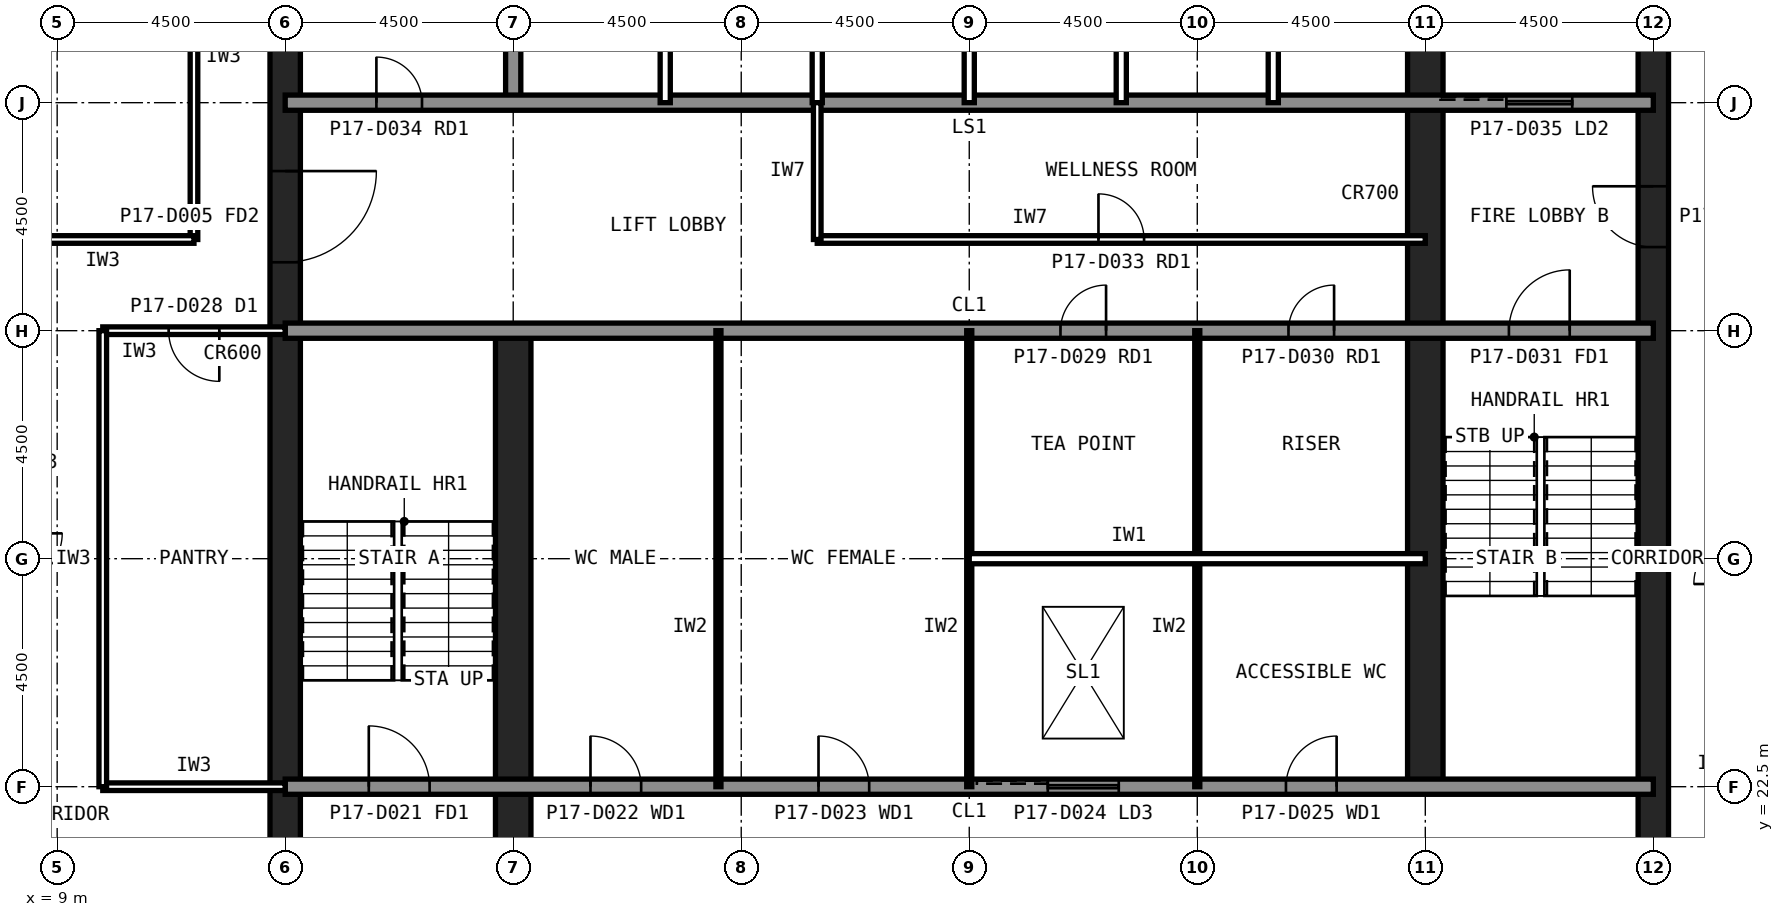
"""IFC4 building model, lengths in metres.
Left out: names, types, materials, properties, quantities, classifications, styles, units other than length and angle.
Written with IfcOpenShell. Run it as: python <this file> out.ifc"""

import sys

from ifc_helpers import new_model, si_unit, direction, frame, frame_2d, origin, place, context, subcontext, project, spatial, rectangle, extrude, element, fill, save


model = new_model("IFC4")
c1 = context("Model", 3, precision=1e-05, world=origin(), true_north=direction((0.0, 1.0)))
c2 = subcontext(c1, "Body", "Model", "MODEL_VIEW")
j1 = project(units=[si_unit("LENGTHUNIT", "METRE"), si_unit("PLANEANGLEUNIT", "RADIAN")], contexts=[c1])
p1 = place(None, origin())
s1 = spatial("IfcSite", under=j1, at=p1, CompositionType="ELEMENT")
p2 = place(p1, origin())
s2 = spatial("IfcBuilding", under=s1, at=p2, CompositionType="ELEMENT")
p3 = place(p2, frame((0.0, 0.0, 71.0)))
s3 = spatial("IfcBuildingStorey", under=s2, at=p3, CompositionType="ELEMENT", Elevation=71.0)
p4 = place(p3, frame((40.5, 13.5, 0.0), z_axis=(0.0, 0.0, 1.0), x_axis=(0.0, 1.0, 0.0)))
e1 = element("IfcWall", 1, at=p4, inside=s3, PredefinedType="SHEAR", context=c2, shape_type="SweptSolid", body=[
    extrude(rectangle(XDim=27.0, YDim=0.6, at=frame_2d((13.5, 0.0))), origin(), (0.0, 0.0, 1.0), 4.2),
])
p5 = place(p4, frame((5.85, 0.0, 0.0)))
e2 = element("IfcOpeningElement", 2, at=p5, cuts=e1, PredefinedType="OPENING", context=c2, shape_type="SweptSolid", body=[
    extrude(rectangle(XDim=1.8, YDim=2.1, at=frame_2d((0.9, 1.05))), frame((0.0, 0.31, 0.0), z_axis=(0.0, -1.0, 0.0), x_axis=(1.0, 0.0, 0.0)), (0.0, 0.0, 1.0), 0.62),
])
p6 = place(p4, frame((19.65, 0.0, 0.0)))
e3 = element("IfcOpeningElement", 3, at=p6, cuts=e1, PredefinedType="OPENING", context=c2, shape_type="SweptSolid", body=[
    extrude(rectangle(XDim=1.2, YDim=2.1, at=frame_2d((0.6, 1.05))), frame((0.0, 0.31, 0.0), z_axis=(0.0, -1.0, 0.0), x_axis=(1.0, 0.0, 0.0)), (0.0, 0.0, 1.0), 0.62),
])
p7 = place(p3, frame((13.5, 40.5, 0.0), z_axis=(0.0, 0.0, 1.0), x_axis=(0.0, -1.0, 0.0)))
e4 = element("IfcWall", 4, at=p7, inside=s3, PredefinedType="SHEAR", context=c2, shape_type="SweptSolid", body=[
    extrude(rectangle(XDim=27.0, YDim=0.6, at=frame_2d((13.5, 0.0))), origin(), (0.0, 0.0, 1.0), 4.2),
])
p8 = place(p7, frame((19.65, 0.0, 0.0)))
e5 = element("IfcOpeningElement", 5, at=p8, cuts=e4, PredefinedType="OPENING", context=c2, shape_type="SweptSolid", body=[
    extrude(rectangle(XDim=1.2, YDim=2.1, at=frame_2d((0.6, 1.05))), frame((0.0, 0.31, 0.0), z_axis=(0.0, -1.0, 0.0), x_axis=(1.0, 0.0, 0.0)), (0.0, 0.0, 1.0), 0.62),
])
p9 = place(p7, frame((5.85, 0.0, 0.0)))
e6 = element("IfcOpeningElement", 6, at=p9, cuts=e4, PredefinedType="OPENING", context=c2, shape_type="SweptSolid", body=[
    extrude(rectangle(XDim=1.8, YDim=2.1, at=frame_2d((0.9, 1.05))), frame((0.0, 0.31, 0.0), z_axis=(0.0, -1.0, 0.0), x_axis=(1.0, 0.0, 0.0)), (0.0, 0.0, 1.0), 0.62),
])
p10 = place(p3, frame((18.0, 13.5, 0.0), z_axis=(0.0, 0.0, 1.0), x_axis=(0.0, 1.0, 0.0)))
e7 = element("IfcWall", 7, at=p10, inside=s3, PredefinedType="SHEAR", context=c2, shape_type="SweptSolid", body=[
    extrude(rectangle(XDim=18.0, YDim=0.7, at=frame_2d((9.0, 0.0))), origin(), (0.0, 0.0, 1.0), 4.2),
])
p11 = place(p3, frame((18.0, 36.0, 0.0), z_axis=(0.0, 0.0, 1.0), x_axis=(0.0, 1.0, 0.0)))
e8 = element("IfcWall", 8, at=p11, inside=s3, PredefinedType="SOLIDWALL", context=c2, shape_type="SweptSolid", body=[
    extrude(rectangle(XDim=4.5, YDim=0.3, at=frame_2d((2.25, 0.0))), origin(), (0.0, 0.0, 1.0), 4.04),
])
p12 = place(p3, frame((36.0, 22.5, 0.0), z_axis=(0.0, 0.0, 1.0), x_axis=(0.0, 1.0, 0.0)))
e9 = element("IfcWall", 9, at=p12, inside=s3, PredefinedType="SHEAR", context=c2, shape_type="SweptSolid", body=[
    extrude(rectangle(XDim=18.0, YDim=0.7, at=frame_2d((9.0, 0.0))), origin(), (0.0, 0.0, 1.0), 4.2),
])
p13 = place(p3, frame((13.5, 36.0, 0.0), z_axis=(0.0, 0.0, 1.0), x_axis=(1.0, 0.0, 0.0)))
e10 = element("IfcWall", 10, at=p13, inside=s3, PredefinedType="SOLIDWALL", context=c2, shape_type="SweptSolid", body=[
    extrude(rectangle(XDim=27.0, YDim=0.3, at=frame_2d((13.5, 0.0))), origin(), (0.0, 0.0, 1.0), 4.04),
])
p14 = place(p13, frame((1.8, 0.0, 0.0)))
e11 = element("IfcOpeningElement", 11, at=p14, cuts=e10, PredefinedType="OPENING", context=c2, shape_type="SweptSolid", body=[
    extrude(rectangle(XDim=0.9, YDim=2.1, at=frame_2d((0.45, 1.05))), frame((0.0, 0.16, 0.0), z_axis=(0.0, -1.0, 0.0), x_axis=(1.0, 0.0, 0.0)), (0.0, 0.0, 1.0), 0.32),
])
p15 = place(p13, frame((24.1, 0.0, 0.0)))
e12 = element("IfcOpeningElement", 12, at=p15, cuts=e10, PredefinedType="OPENING", context=c2, shape_type="SweptSolid", body=[
    extrude(rectangle(XDim=1.3, YDim=2.2, at=frame_2d((0.65, 1.1))), frame((0.0, 0.16, 0.0), z_axis=(0.0, -1.0, 0.0), x_axis=(1.0, 0.0, 0.0)), (0.0, 0.0, 1.0), 0.32),
])
p16 = place(p3, frame((13.5, 22.5, 0.0), z_axis=(0.0, 0.0, 1.0), x_axis=(1.0, 0.0, 0.0)))
e13 = element("IfcWall", 13, at=p16, inside=s3, PredefinedType="SOLIDWALL", context=c2, shape_type="SweptSolid", body=[
    extrude(rectangle(XDim=27.0, YDim=0.3, at=frame_2d((13.5, 0.0))), origin(), (0.0, 0.0, 1.0), 4.04),
])
p17 = place(p16, frame((1.65, 0.0, 0.0)))
e14 = element("IfcOpeningElement", 14, at=p17, cuts=e13, PredefinedType="OPENING", context=c2, shape_type="SweptSolid", body=[
    extrude(rectangle(XDim=1.2, YDim=2.1, at=frame_2d((0.6, 1.05))), frame((0.0, 0.16, 0.0), z_axis=(0.0, -1.0, 0.0), x_axis=(1.0, 0.0, 0.0)), (0.0, 0.0, 1.0), 0.32),
])
p18 = place(p16, frame((6.025, 0.0, 0.0)))
e15 = element("IfcOpeningElement", 15, at=p18, cuts=e13, PredefinedType="OPENING", context=c2, shape_type="SweptSolid", body=[
    extrude(rectangle(XDim=1.0, YDim=2.1, at=frame_2d((0.5, 1.05))), frame((0.0, 0.16, 0.0), z_axis=(0.0, -1.0, 0.0), x_axis=(1.0, 0.0, 0.0)), (0.0, 0.0, 1.0), 0.32),
])
p19 = place(p16, frame((10.525, 0.0, 0.0)))
e16 = element("IfcOpeningElement", 16, at=p19, cuts=e13, PredefinedType="OPENING", context=c2, shape_type="SweptSolid", body=[
    extrude(rectangle(XDim=1.0, YDim=2.1, at=frame_2d((0.5, 1.05))), frame((0.0, 0.16, 0.0), z_axis=(0.0, -1.0, 0.0), x_axis=(1.0, 0.0, 0.0)), (0.0, 0.0, 1.0), 0.32),
])
p20 = place(p16, frame((19.75, 0.0, 0.0)))
e17 = element("IfcOpeningElement", 17, at=p20, cuts=e13, PredefinedType="OPENING", context=c2, shape_type="SweptSolid", body=[
    extrude(rectangle(XDim=1.0, YDim=2.1, at=frame_2d((0.5, 1.05))), frame((0.0, 0.16, 0.0), z_axis=(0.0, -1.0, 0.0), x_axis=(1.0, 0.0, 0.0)), (0.0, 0.0, 1.0), 0.32),
])
p21 = place(p16, frame((15.05, 0.0, 0.0)))
e18 = element("IfcOpeningElement", 18, at=p21, cuts=e13, PredefinedType="OPENING", context=c2, shape_type="SweptSolid", body=[
    extrude(rectangle(XDim=1.4, YDim=2.4, at=frame_2d((0.7, 1.2))), frame((0.0, 0.16, 0.0), z_axis=(0.0, -1.0, 0.0), x_axis=(1.0, 0.0, 0.0)), (0.0, 0.0, 1.0), 0.32),
])
p22 = place(p3, frame((13.5, 31.5, 0.0), z_axis=(0.0, 0.0, 1.0), x_axis=(1.0, 0.0, 0.0)))
e19 = element("IfcWall", 19, at=p22, inside=s3, PredefinedType="SOLIDWALL", context=c2, shape_type="SweptSolid", body=[
    extrude(rectangle(XDim=27.0, YDim=0.3, at=frame_2d((13.5, 0.0))), origin(), (0.0, 0.0, 1.0), 4.04),
])
p23 = place(p22, frame((24.15, 0.0, 0.0)))
e20 = element("IfcOpeningElement", 20, at=p23, cuts=e19, PredefinedType="OPENING", context=c2, shape_type="SweptSolid", body=[
    extrude(rectangle(XDim=1.2, YDim=2.1, at=frame_2d((0.6, 1.05))), frame((0.0, 0.16, 0.0), z_axis=(0.0, -1.0, 0.0), x_axis=(1.0, 0.0, 0.0)), (0.0, 0.0, 1.0), 0.32),
])
p24 = place(p22, frame((15.3, 0.0, 0.0)))
e21 = element("IfcOpeningElement", 21, at=p24, cuts=e19, PredefinedType="OPENING", context=c2, shape_type="SweptSolid", body=[
    extrude(rectangle(XDim=0.9, YDim=2.1, at=frame_2d((0.45, 1.05))), frame((0.0, 0.16, 0.0), z_axis=(0.0, -1.0, 0.0), x_axis=(1.0, 0.0, 0.0)), (0.0, 0.0, 1.0), 0.32),
])
p25 = place(p22, frame((19.8, 0.0, 0.0)))
e22 = element("IfcOpeningElement", 22, at=p25, cuts=e19, PredefinedType="OPENING", context=c2, shape_type="SweptSolid", body=[
    extrude(rectangle(XDim=0.9, YDim=2.1, at=frame_2d((0.45, 1.05))), frame((0.0, 0.16, 0.0), z_axis=(0.0, -1.0, 0.0), x_axis=(1.0, 0.0, 0.0)), (0.0, 0.0, 1.0), 0.32),
])
for number, where, z_axis, x_axis in (
    (23, (21.0, 36.0, 0.0), (0.0, 0.0, 1.0), (0.0, 1.0, 0.0)),
    (24, (24.0, 36.0, 0.0), (0.0, 0.0, 1.0), (0.0, 1.0, 0.0)),
    (25, (27.0, 36.0, 0.0), (0.0, 0.0, 1.0), (0.0, 1.0, 0.0)),
    (26, (30.0, 36.0, 0.0), (0.0, 0.0, 1.0), (0.0, 1.0, 0.0)),
    (27, (33.0, 36.0, 0.0), (0.0, 0.0, 1.0), (0.0, 1.0, 0.0)),
):
    element("IfcWall", number, at=place(p3, frame(where, z_axis=z_axis, x_axis=x_axis)), inside=s3, PredefinedType="PARTITIONING", context=c2, shape_type="SweptSolid", body=[
        extrude(rectangle(XDim=4.5, YDim=0.2, at=frame_2d((2.25, 0.0))), origin(), (0.0, 0.0, 1.0), 4.04),
    ])
for number, where, z_axis, x_axis in (
    (28, (22.05, 22.5, 0.0), (0.0, 0.0, 1.0), (0.0, 1.0, 0.0)),
    (29, (27.0, 22.5, 0.0), (0.0, 0.0, 1.0), (0.0, 1.0, 0.0)),
    (30, (31.5, 22.5, 0.0), (0.0, 0.0, 1.0), (0.0, 1.0, 0.0)),
):
    element("IfcWall", number, at=place(p3, frame(where, z_axis=z_axis, x_axis=x_axis)), inside=s3, PredefinedType="PLUMBINGWALL", context=c2, shape_type="SweptSolid", body=[
        extrude(rectangle(XDim=9.0, YDim=0.1, at=frame_2d((4.5, 0.0))), origin(), (0.0, 0.0, 1.0), 4.04),
    ])
p26 = place(p3, frame((27.0, 27.0, 0.0), z_axis=(0.0, 0.0, 1.0), x_axis=(1.0, 0.0, 0.0)))
e31 = element("IfcWall", 31, at=p26, inside=s3, PredefinedType="PARTITIONING", context=c2, shape_type="SweptSolid", body=[
    extrude(rectangle(XDim=9.0, YDim=0.2, at=frame_2d((4.5, 0.0))), origin(), (0.0, 0.0, 1.0), 4.04),
])
p27 = place(p3, frame((18.0, 33.3, 0.0), z_axis=(0.0, 0.0, 1.0), x_axis=(1.0, 0.0, 0.0)))
e32 = element("IfcWall", 32, at=p27, inside=s3, PredefinedType="PARTITIONING", context=c2, shape_type="SweptSolid", body=[
    extrude(rectangle(XDim=18.0, YDim=0.15, at=frame_2d((9.0, 0.0))), origin(), (0.0, 0.0, 1.0), 4.04),
])
p28 = place(p27, frame((1.8, 0.0, 0.0)))
e33 = element("IfcOpeningElement", 33, at=p28, cuts=e32, PredefinedType="OPENING", context=c2, shape_type="SweptSolid", body=[
    extrude(rectangle(XDim=0.9, YDim=2.1, at=frame_2d((0.45, 1.05))), frame((0.0, 0.085, 0.0), z_axis=(0.0, -1.0, 0.0), x_axis=(1.0, 0.0, 0.0)), (0.0, 0.0, 1.0), 0.17),
])
p29 = place(p27, frame((7.8, 0.0, 0.0)))
e34 = element("IfcOpeningElement", 34, at=p29, cuts=e32, PredefinedType="OPENING", context=c2, shape_type="SweptSolid", body=[
    extrude(rectangle(XDim=0.9, YDim=2.1, at=frame_2d((0.45, 1.05))), frame((0.0, 0.085, 0.0), z_axis=(0.0, -1.0, 0.0), x_axis=(1.0, 0.0, 0.0)), (0.0, 0.0, 1.0), 0.17),
])
p30 = place(p27, frame((14.55, 0.0, 0.0)))
e35 = element("IfcOpeningElement", 35, at=p30, cuts=e32, PredefinedType="OPENING", context=c2, shape_type="SweptSolid", body=[
    extrude(rectangle(XDim=0.9, YDim=2.1, at=frame_2d((0.45, 1.05))), frame((0.0, 0.085, 0.0), z_axis=(0.0, -1.0, 0.0), x_axis=(1.0, 0.0, 0.0)), (0.0, 0.0, 1.0), 0.17),
])
for number, where, z_axis, x_axis in (
    (36, (18.0, 33.3, 0.0), (0.0, 0.0, 1.0), (0.0, 1.0, 0.0)),
    (37, (22.5, 33.3, 0.0), (0.0, 0.0, 1.0), (0.0, 1.0, 0.0)),
    (38, (30.0, 33.3, 0.0), (0.0, 0.0, 1.0), (0.0, 1.0, 0.0)),
):
    element("IfcWall", number, at=place(p3, frame(where, z_axis=z_axis, x_axis=x_axis)), inside=s3, PredefinedType="PARTITIONING", context=c2, shape_type="SweptSolid", body=[
        extrude(rectangle(XDim=2.7, YDim=0.15, at=frame_2d((1.35, 0.0))), origin(), (0.0, 0.0, 1.0), 4.04),
    ])
p31 = place(p3, frame((11.7, 42.3, 0.0), z_axis=(0.0, 0.0, 1.0), x_axis=(0.0, -1.0, 0.0)))
e39 = element("IfcWall", 39, at=p31, inside=s3, PredefinedType="PARTITIONING", context=c2, shape_type="SweptSolid", body=[
    extrude(rectangle(XDim=9.0, YDim=0.15, at=frame_2d((4.5, 0.0))), origin(), (0.0, 0.0, 1.0), 4.04),
])
p32 = place(p3, frame((11.7, 33.3, 0.0), z_axis=(0.0, 0.0, 1.0), x_axis=(-1.0, 0.0, 0.0)))
e40 = element("IfcWall", 40, at=p32, inside=s3, PredefinedType="PARTITIONING", context=c2, shape_type="SweptSolid", body=[
    extrude(rectangle(XDim=3.6, YDim=0.15, at=frame_2d((1.8, 0.0))), origin(), (0.0, 0.0, 1.0), 4.04),
])
p33 = place(p3, frame((9.9, 22.5, 0.0), z_axis=(0.0, 0.0, 1.0), x_axis=(1.0, 0.0, 0.0)))
e41 = element("IfcWall", 41, at=p33, inside=s3, PredefinedType="PARTITIONING", context=c2, shape_type="SweptSolid", body=[
    extrude(rectangle(XDim=3.6, YDim=0.15, at=frame_2d((1.8, 0.0))), origin(), (0.0, 0.0, 1.0), 3.189),
])
p34 = place(p3, frame((13.5, 31.5, 0.0), z_axis=(0.0, 0.0, 1.0), x_axis=(-1.0, 0.0, 0.0)))
e42 = element("IfcWall", 42, at=p34, inside=s3, PredefinedType="PARTITIONING", context=c2, shape_type="SweptSolid", body=[
    extrude(rectangle(XDim=3.6, YDim=0.15, at=frame_2d((1.8, 0.0))), origin(), (0.0, 0.0, 1.0), 3.189),
])
p35 = place(p34, frame((1.3, 0.0, 0.0)))
e43 = element("IfcOpeningElement", 43, at=p35, cuts=e42, PredefinedType="OPENING", context=c2, shape_type="SweptSolid", body=[
    extrude(rectangle(XDim=1.0, YDim=2.1, at=frame_2d((0.5, 1.05))), frame((0.0, 0.085, 0.0), z_axis=(0.0, -1.0, 0.0), x_axis=(1.0, 0.0, 0.0)), (0.0, 0.0, 1.0), 0.17),
])
p36 = place(p3, frame((9.9, 31.5, 0.0), z_axis=(0.0, 0.0, 1.0), x_axis=(0.0, -1.0, 0.0)))
e44 = element("IfcWall", 44, at=p36, inside=s3, PredefinedType="PARTITIONING", context=c2, shape_type="SweptSolid", body=[
    extrude(rectangle(XDim=9.0, YDim=0.15, at=frame_2d((4.5, 0.0))), origin(), (0.0, 0.0, 1.0), 4.04),
])
p37 = place(p9, origin())
e45 = element("IfcDoor", 45, at=p37, inside=s3, OperationType="SINGLE_SWING_LEFT", PredefinedType="DOOR", context=c2, shape_type="SweptSolid", body=[
    extrude(rectangle(XDim=1.8, YDim=2.1, at=frame_2d((0.9, 1.05))), frame((0.0, 0.025, 0.0), z_axis=(0.0, -1.0, 0.0), x_axis=(1.0, 0.0, 0.0)), (0.0, 0.0, 1.0), 0.05),
])
fill(e6, e45)
p38 = place(p6, origin())
e46 = element("IfcDoor", 46, at=p38, inside=s3, OperationType="SINGLE_SWING_RIGHT", PredefinedType="DOOR", context=c2, shape_type="SweptSolid", body=[
    extrude(rectangle(XDim=1.2, YDim=2.1, at=frame_2d((0.6, 1.05))), frame((0.0, 0.025, 0.0), z_axis=(0.0, -1.0, 0.0), x_axis=(1.0, 0.0, 0.0)), (0.0, 0.0, 1.0), 0.05),
])
fill(e3, e46)
p39 = place(p17, origin())
e47 = element("IfcDoor", 47, at=p39, inside=s3, OperationType="SINGLE_SWING_LEFT", PredefinedType="DOOR", context=c2, shape_type="SweptSolid", body=[
    extrude(rectangle(XDim=1.2, YDim=2.1, at=frame_2d((0.6, 1.05))), frame((0.0, 0.025, 0.0), z_axis=(0.0, -1.0, 0.0), x_axis=(1.0, 0.0, 0.0)), (0.0, 0.0, 1.0), 0.05),
])
fill(e14, e47)
p40 = place(p23, origin())
e48 = element("IfcDoor", 48, at=p40, inside=s3, OperationType="SINGLE_SWING_RIGHT", PredefinedType="DOOR", context=c2, shape_type="SweptSolid", body=[
    extrude(rectangle(XDim=1.2, YDim=2.1, at=frame_2d((0.6, 1.05))), frame((0.0, 0.025, 0.0), z_axis=(0.0, -1.0, 0.0), x_axis=(1.0, 0.0, 0.0)), (0.0, 0.0, 1.0), 0.05),
])
fill(e20, e48)
p41 = place(p18, origin())
e49 = element("IfcDoor", 49, at=p41, inside=s3, OperationType="SINGLE_SWING_LEFT", PredefinedType="DOOR", context=c2, shape_type="SweptSolid", body=[
    extrude(rectangle(XDim=1.0, YDim=2.1, at=frame_2d((0.5, 1.05))), frame((0.0, 0.025, 0.0), z_axis=(0.0, -1.0, 0.0), x_axis=(1.0, 0.0, 0.0)), (0.0, 0.0, 1.0), 0.05),
])
fill(e15, e49)
p42 = place(p19, origin())
e50 = element("IfcDoor", 50, at=p42, inside=s3, OperationType="SINGLE_SWING_LEFT", PredefinedType="DOOR", context=c2, shape_type="SweptSolid", body=[
    extrude(rectangle(XDim=1.0, YDim=2.1, at=frame_2d((0.5, 1.05))), frame((0.0, 0.025, 0.0), z_axis=(0.0, -1.0, 0.0), x_axis=(1.0, 0.0, 0.0)), (0.0, 0.0, 1.0), 0.05),
])
fill(e16, e50)
p43 = place(p20, origin())
e51 = element("IfcDoor", 51, at=p43, inside=s3, OperationType="SINGLE_SWING_RIGHT", PredefinedType="DOOR", context=c2, shape_type="SweptSolid", body=[
    extrude(rectangle(XDim=1.0, YDim=2.1, at=frame_2d((0.5, 1.05))), frame((0.0, 0.025, 0.0), z_axis=(0.0, -1.0, 0.0), x_axis=(1.0, 0.0, 0.0)), (0.0, 0.0, 1.0), 0.05),
])
fill(e17, e51)
p44 = place(p24, origin())
e52 = element("IfcDoor", 52, at=p44, inside=s3, OperationType="SINGLE_SWING_RIGHT", PredefinedType="DOOR", context=c2, shape_type="SweptSolid", body=[
    extrude(rectangle(XDim=0.9, YDim=2.1, at=frame_2d((0.45, 1.05))), frame((0.0, 0.025, 0.0), z_axis=(0.0, -1.0, 0.0), x_axis=(1.0, 0.0, 0.0)), (0.0, 0.0, 1.0), 0.05),
])
fill(e21, e52)
p45 = place(p25, origin())
e53 = element("IfcDoor", 53, at=p45, inside=s3, OperationType="SINGLE_SWING_RIGHT", PredefinedType="DOOR", context=c2, shape_type="SweptSolid", body=[
    extrude(rectangle(XDim=0.9, YDim=2.1, at=frame_2d((0.45, 1.05))), frame((0.0, 0.025, 0.0), z_axis=(0.0, -1.0, 0.0), x_axis=(1.0, 0.0, 0.0)), (0.0, 0.0, 1.0), 0.05),
])
fill(e22, e53)
p46 = place(p14, origin())
e54 = element("IfcDoor", 54, at=p46, inside=s3, OperationType="SINGLE_SWING_LEFT", PredefinedType="DOOR", context=c2, shape_type="SweptSolid", body=[
    extrude(rectangle(XDim=0.9, YDim=2.1, at=frame_2d((0.45, 1.05))), frame((0.0, 0.025, 0.0), z_axis=(0.0, -1.0, 0.0), x_axis=(1.0, 0.0, 0.0)), (0.0, 0.0, 1.0), 0.05),
])
fill(e11, e54)
p47 = place(p28, origin())
e55 = element("IfcDoor", 55, at=p47, inside=s3, OperationType="SINGLE_SWING_LEFT", PredefinedType="DOOR", context=c2, shape_type="SweptSolid", body=[
    extrude(rectangle(XDim=0.9, YDim=2.1, at=frame_2d((0.45, 1.05))), frame((0.0, 0.025, 0.0), z_axis=(0.0, -1.0, 0.0), x_axis=(1.0, 0.0, 0.0)), (0.0, 0.0, 1.0), 0.05),
])
fill(e33, e55)
p48 = place(p29, origin())
e56 = element("IfcDoor", 56, at=p48, inside=s3, OperationType="SINGLE_SWING_LEFT", PredefinedType="DOOR", context=c2, shape_type="SweptSolid", body=[
    extrude(rectangle(XDim=0.9, YDim=2.1, at=frame_2d((0.45, 1.05))), frame((0.0, 0.025, 0.0), z_axis=(0.0, -1.0, 0.0), x_axis=(1.0, 0.0, 0.0)), (0.0, 0.0, 1.0), 0.05),
])
fill(e34, e56)
p49 = place(p30, origin())
e57 = element("IfcDoor", 57, at=p49, inside=s3, OperationType="SINGLE_SWING_RIGHT", PredefinedType="DOOR", context=c2, shape_type="SweptSolid", body=[
    extrude(rectangle(XDim=0.9, YDim=2.1, at=frame_2d((0.45, 1.05))), frame((0.0, 0.025, 0.0), z_axis=(0.0, -1.0, 0.0), x_axis=(1.0, 0.0, 0.0)), (0.0, 0.0, 1.0), 0.05),
])
fill(e35, e57)
p50 = place(p15, origin())
e58 = element("IfcDoor", 58, at=p50, inside=s3, OperationType="SLIDING_TO_LEFT", PredefinedType="DOOR", context=c2, shape_type="SweptSolid", body=[
    extrude(rectangle(XDim=1.3, YDim=2.2, at=frame_2d((0.65, 1.1))), frame((0.0, 0.025, 0.0), z_axis=(0.0, -1.0, 0.0), x_axis=(1.0, 0.0, 0.0)), (0.0, 0.0, 1.0), 0.05),
])
fill(e12, e58)
p51 = place(p21, origin())
e59 = element("IfcDoor", 59, at=p51, inside=s3, OperationType="SLIDING_TO_LEFT", PredefinedType="DOOR", context=c2, shape_type="SweptSolid", body=[
    extrude(rectangle(XDim=1.4, YDim=2.4, at=frame_2d((0.7, 1.2))), frame((0.0, 0.025, 0.0), z_axis=(0.0, -1.0, 0.0), x_axis=(1.0, 0.0, 0.0)), (0.0, 0.0, 1.0), 0.05),
])
fill(e18, e59)
p52 = place(p35, origin())
e60 = element("IfcDoor", 60, at=p52, inside=s3, OperationType="SINGLE_SWING_LEFT", PredefinedType="DOOR", context=c2, shape_type="SweptSolid", body=[
    extrude(rectangle(XDim=1.0, YDim=2.1, at=frame_2d((0.5, 1.05))), frame((0.0, 0.025, 0.0), z_axis=(0.0, -1.0, 0.0), x_axis=(1.0, 0.0, 0.0)), (0.0, 0.0, 1.0), 0.05),
])
fill(e43, e60)
save(model, sys.argv[1])
